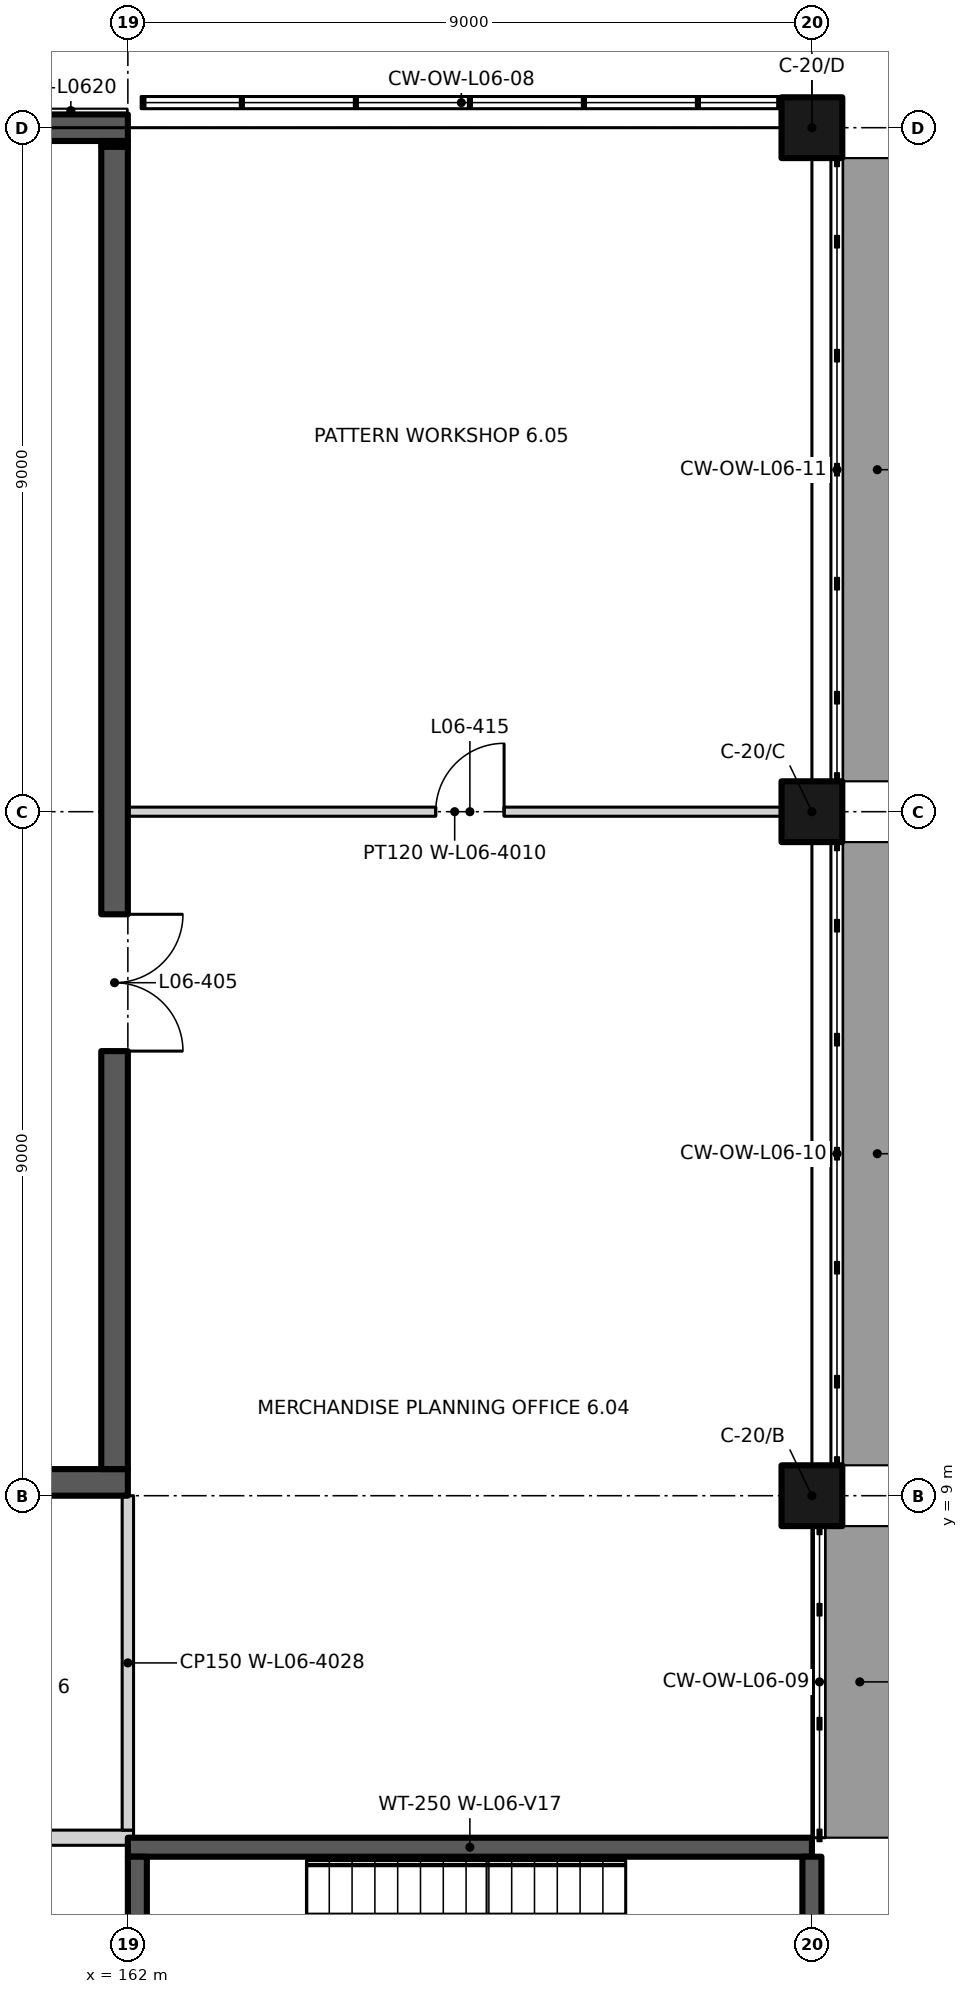
"""IFC4 building model, lengths in metres.
Left out: names, types, materials, properties, quantities, classifications, styles, units other than length and angle.
Written with IfcOpenShell. Run it as: python <this file> out.ifc"""

import sys

from ifc_helpers import new_model, si_unit, direction, frame, frame_2d, origin, origin_2d, place, context, subcontext, project, spatial, rectangle, extrude, element, fill, save


model = new_model("IFC4")
c1 = context("Model", 3, precision=1e-05, world=origin(), true_north=direction((0.0, 1.0)))
c2 = subcontext(c1, "Body", "Model", "MODEL_VIEW")
j1 = project(units=[si_unit("LENGTHUNIT", "METRE"), si_unit("PLANEANGLEUNIT", "RADIAN")], contexts=[c1])
p1 = place(None, origin())
s1 = spatial("IfcSite", under=j1, at=p1, CompositionType="ELEMENT")
p2 = place(p1, origin())
s2 = spatial("IfcBuilding", under=s1, at=p2, CompositionType="ELEMENT")
p3 = place(p2, frame((0.0, 0.0, 28.5)))
s3 = spatial("IfcBuildingStorey", under=s2, at=p3, CompositionType="ELEMENT", Elevation=28.5)
for number, where, z_axis, x_axis in (
    (1, (171.0, 9.0, 0.0), (0.0, 0.0, 1.0), (1.0, 0.0, 0.0)),
    (2, (171.0, 18.0, 0.0), (0.0, 0.0, 1.0), (1.0, 0.0, 0.0)),
    (3, (171.0, 27.0, 0.0), (0.0, 0.0, 1.0), (1.0, 0.0, 0.0)),
):
    element("IfcColumn", number, at=place(p3, frame(where, z_axis=z_axis, x_axis=x_axis)), inside=s3, PredefinedType="COLUMN", context=c2, shape_type="SweptSolid", body=[
        extrude(rectangle(XDim=0.8, YDim=0.8, at=origin_2d()), origin(), (0.0, 0.0, 1.0), 4.5),
    ])
p4 = place(p3, frame((162.0, 4.375, 0.0), z_axis=(0.0, 0.0, 1.0), x_axis=(1.0, 0.0, 0.0)))
e4 = element("IfcWall", 4, at=p4, inside=s3, PredefinedType="SHEAR", context=c2, shape_type="SweptSolid", body=[
    extrude(rectangle(XDim=9.0, YDim=0.25, at=frame_2d((4.5, 0.0))), origin(), (0.0, 0.0, 1.0), 4.5),
])
p5 = place(p3, frame((162.125, 0.4, 0.0), z_axis=(0.0, 0.0, 1.0), x_axis=(0.0, 1.0, 0.0)))
e5 = element("IfcWall", 5, at=p5, inside=s3, PredefinedType="SHEAR", context=c2, shape_type="SweptSolid", body=[
    extrude(rectangle(XDim=3.85, YDim=0.25, at=frame_2d((1.925, 0.0))), origin(), (0.0, 0.0, 1.0), 4.5),
])
p6 = place(p5, frame((2.4, 0.0, 0.0), z_axis=(0.0, 0.0, 1.0), x_axis=(-1.0, 0.0, 0.0)))
e6 = element("IfcOpeningElement", 6, at=p6, cuts=e5, PredefinedType="OPENING", context=c2, shape_type="SweptSolid", body=[
    extrude(rectangle(XDim=1.1, YDim=2.1, at=frame_2d((0.55, 1.05))), frame((0.0, 0.135, 0.0), z_axis=(0.0, -1.0, 0.0), x_axis=(1.0, 0.0, 0.0)), (0.0, 0.0, 1.0), 0.27),
])
p7 = place(p3, frame((171.0, 2.188, 0.0), z_axis=(0.0, 0.0, 1.0), x_axis=(0.0, 1.0, 0.0)))
e7 = element("IfcWall", 7, at=p7, inside=s3, PredefinedType="SHEAR", context=c2, shape_type="SweptSolid", body=[
    extrude(rectangle(XDim=2.062, YDim=0.25, at=frame_2d((1.031, 0.0))), origin(), (0.0, 0.0, 1.0), 4.5),
])
p8 = place(p3, frame((144.0, 27.0, 0.0), z_axis=(0.0, 0.0, 1.0), x_axis=(1.0, 0.0, 0.0)))
e8 = element("IfcWall", 8, at=p8, inside=s3, PredefinedType="SOLIDWALL", context=c2, shape_type="SweptSolid", body=[
    extrude(rectangle(XDim=18.0, YDim=0.35, at=frame_2d((9.0, 0.0))), origin(), (0.0, 0.0, 1.0), 3.6),
])
p9 = place(p8, frame((4.2, 0.0, 0.6)))
e9 = element("IfcOpeningElement", 9, at=p9, cuts=e8, PredefinedType="OPENING", context=c2, shape_type="SweptSolid", body=[
    extrude(rectangle(XDim=0.6, YDim=2.4, at=frame_2d((0.3, 1.2))), frame((0.0, 0.185, 0.0), z_axis=(0.0, -1.0, 0.0), x_axis=(1.0, 0.0, 0.0)), (0.0, 0.0, 1.0), 0.37),
])
p10 = place(p8, frame((13.2, 0.0, 0.6)))
e10 = element("IfcOpeningElement", 10, at=p10, cuts=e8, PredefinedType="OPENING", context=c2, shape_type="SweptSolid", body=[
    extrude(rectangle(XDim=0.6, YDim=2.4, at=frame_2d((0.3, 1.2))), frame((0.0, 0.185, 0.0), z_axis=(0.0, -1.0, 0.0), x_axis=(1.0, 0.0, 0.0)), (0.0, 0.0, 1.0), 0.37),
])
p11 = place(p3, frame((158.9, 4.5, 0.0), z_axis=(0.0, 0.0, 1.0), x_axis=(1.0, 0.0, 0.0)))
e11 = element("IfcWall", 11, at=p11, inside=s3, PredefinedType="PARTITIONING", context=c2, shape_type="SweptSolid", body=[
    extrude(rectangle(XDim=3.175, YDim=0.2, at=frame_2d((1.587, 0.0))), origin(), (0.0, 0.0, 1.0), 4.2),
])
p12 = place(p3, frame((144.0, 9.175, 0.0), z_axis=(0.0, 0.0, 1.0), x_axis=(1.0, 0.0, 0.0)))
e12 = element("IfcWall", 12, at=p12, inside=s3, PredefinedType="SHEAR", context=c2, shape_type="SweptSolid", body=[
    extrude(rectangle(XDim=18.0, YDim=0.35, at=frame_2d((9.0, 0.0))), origin(), (0.0, 0.0, 1.0), 4.2),
])
p13 = place(p12, frame((16.463, 0.0, 0.0), z_axis=(0.0, 0.0, 1.0), x_axis=(-1.0, 0.0, 0.0)))
e13 = element("IfcOpeningElement", 13, at=p13, cuts=e12, PredefinedType="OPENING", context=c2, shape_type="SweptSolid", body=[
    extrude(rectangle(XDim=2.1, YDim=2.4, at=frame_2d((1.05, 1.2))), frame((0.0, 0.185, 0.0), z_axis=(0.0, -1.0, 0.0), x_axis=(1.0, 0.0, 0.0)), (0.0, 0.0, 1.0), 0.37),
])
p14 = place(p3, frame((162.0, 18.0, 0.0), z_axis=(0.0, 0.0, 1.0), x_axis=(1.0, 0.0, 0.0)))
e14 = element("IfcWall", 14, at=p14, inside=s3, PredefinedType="PARTITIONING", context=c2, shape_type="SweptSolid", body=[
    extrude(rectangle(XDim=8.6, YDim=0.12, at=frame_2d((4.3, 0.0))), origin(), (0.0, 0.0, 1.0), 4.2),
])
p15 = place(p14, frame((4.05, 0.0, 0.0)))
e15 = element("IfcOpeningElement", 15, at=p15, cuts=e14, PredefinedType="OPENING", context=c2, shape_type="SweptSolid", body=[
    extrude(rectangle(XDim=0.9, YDim=2.1, at=frame_2d((0.45, 1.05))), frame((0.0, 0.07, 0.0), z_axis=(0.0, -1.0, 0.0), x_axis=(1.0, 0.0, 0.0)), (0.0, 0.0, 1.0), 0.14),
])
p16 = place(p3, frame((161.825, 9.35, 0.0), z_axis=(0.0, 0.0, 1.0), x_axis=(0.0, 1.0, 0.0)))
e16 = element("IfcWall", 16, at=p16, inside=s3, PredefinedType="SHEAR", context=c2, shape_type="SweptSolid", body=[
    extrude(rectangle(XDim=17.4, YDim=0.35, at=frame_2d((8.7, 0.0))), origin(), (0.0, 0.0, 1.0), 4.2),
])
p17 = place(p16, frame((7.3, 0.0, 0.0), z_axis=(0.0, 0.0, 1.0), x_axis=(-1.0, 0.0, 0.0)))
e17 = element("IfcOpeningElement", 17, at=p17, cuts=e16, PredefinedType="OPENING", context=c2, shape_type="SweptSolid", body=[
    extrude(rectangle(XDim=1.8, YDim=2.4, at=frame_2d((0.9, 1.2))), frame((0.0, 0.185, 0.0), z_axis=(0.0, -1.0, 0.0), x_axis=(1.0, 0.0, 0.0)), (0.0, 0.0, 1.0), 0.37),
])
p18 = place(p3, frame((161.825, 26.75, 0.0), z_axis=(0.0, 0.0, 1.0), x_axis=(0.0, 1.0, 0.0)))
e18 = element("IfcWall", 18, at=p18, inside=s3, PredefinedType="SHEAR", context=c2, shape_type="SweptSolid", body=[
    extrude(rectangle(XDim=0.075, YDim=0.35, at=frame_2d((0.038, 0.0))), origin(), (0.0, 0.0, 1.0), 3.6),
])
p19 = place(p3, frame((162.0, 4.6, 0.0), z_axis=(0.0, 0.0, 1.0), x_axis=(0.0, 1.0, 0.0)))
e19 = element("IfcWall", 19, at=p19, inside=s3, PredefinedType="PARTITIONING", context=c2, shape_type="SweptSolid", body=[
    extrude(rectangle(XDim=4.4, YDim=0.15, at=frame_2d((2.2, 0.0))), origin(), (0.0, 0.0, 1.0), 4.2),
])
p20 = place(p17, origin())
e20 = element("IfcDoor", 20, at=p20, inside=s3, OperationType="DOUBLE_DOOR_SINGLE_SWING", PredefinedType="DOOR", context=c2, shape_type="SweptSolid", body=[
    extrude(rectangle(XDim=1.8, YDim=2.4, at=frame_2d((0.9, 1.2))), frame((0.0, 0.025, 0.0), z_axis=(0.0, -1.0, 0.0), x_axis=(1.0, 0.0, 0.0)), (0.0, 0.0, 1.0), 0.05),
])
fill(e17, e20)
p21 = place(p15, origin())
e21 = element("IfcDoor", 21, at=p21, inside=s3, OperationType="SINGLE_SWING_RIGHT", PredefinedType="DOOR", context=c2, shape_type="SweptSolid", body=[
    extrude(rectangle(XDim=0.9, YDim=2.1, at=frame_2d((0.45, 1.05))), frame((0.0, 0.025, 0.0), z_axis=(0.0, -1.0, 0.0), x_axis=(1.0, 0.0, 0.0)), (0.0, 0.0, 1.0), 0.05),
])
fill(e15, e21)
save(model, sys.argv[1])
